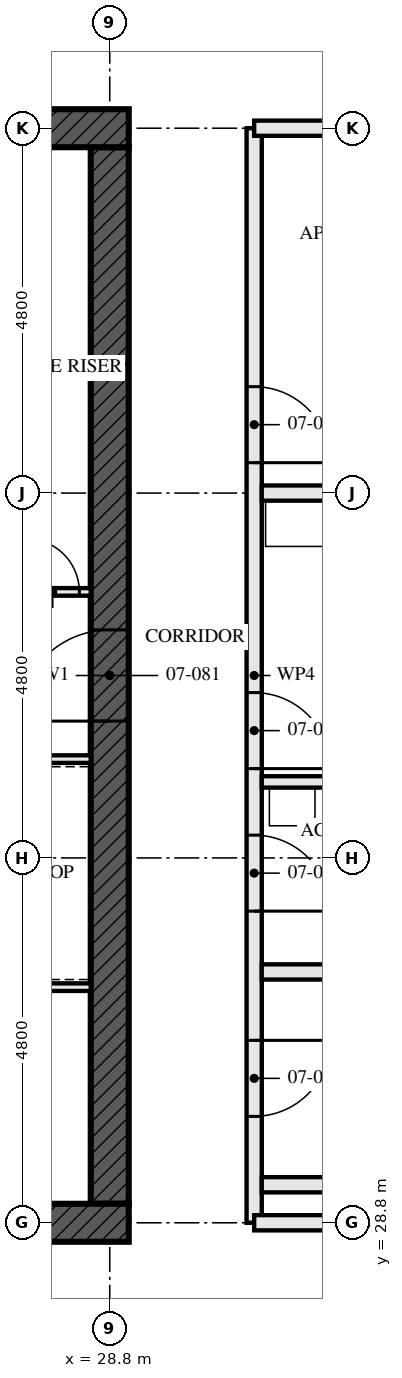
"""IFC4 building model, lengths in metres.
Left out: names, types, materials, properties, quantities, classifications, styles, units other than length and angle.
Written with IfcOpenShell. Run it as: python <this file> out.ifc"""

import sys

from ifc_helpers import new_model, si_unit, direction, frame, frame_2d, origin, place, context, subcontext, project, spatial, rectangle, extrude, element, fill, save


model = new_model("IFC4")
c1 = context("Model", 3, precision=1e-05, world=origin(), true_north=direction((0.0, 1.0)))
c2 = subcontext(c1, "Body", "Model", "MODEL_VIEW")
j1 = project(units=[si_unit("LENGTHUNIT", "METRE"), si_unit("PLANEANGLEUNIT", "RADIAN")], contexts=[c1])
p1 = place(None, origin())
s1 = spatial("IfcSite", under=j1, at=p1, CompositionType="ELEMENT")
p2 = place(p1, origin())
s2 = spatial("IfcBuilding", under=s1, at=p2, CompositionType="ELEMENT")
p3 = place(p2, frame((0.0, 0.0, 30.5)))
s3 = spatial("IfcBuildingStorey", under=s2, at=p3, CompositionType="ELEMENT", Elevation=30.5)
p4 = place(p3, frame((14.15, 28.8, -0.17), z_axis=(0.0, 0.0, 1.0), x_axis=(1.0, 0.0, 0.0)))
e1 = element("IfcWall", 1, at=p4, inside=s3, PredefinedType="SHEAR", context=c2, shape_type="SweptSolid", body=[
    extrude(rectangle(XDim=14.9, YDim=0.5, at=frame_2d((7.45, 0.0))), origin(), (0.0, 0.0, 1.0), 3.5),
])
p5 = place(p4, frame((6.85, 0.0, 0.17)))
e2 = element("IfcOpeningElement", 2, at=p5, cuts=e1, PredefinedType="OPENING", context=c2, shape_type="SweptSolid", body=[
    extrude(rectangle(XDim=1.2, YDim=2.1, at=frame_2d((0.6, 1.05))), frame((0.0, 0.26, 0.0), z_axis=(0.0, -1.0, 0.0), x_axis=(1.0, 0.0, 0.0)), (0.0, 0.0, 1.0), 0.521),
])
p6 = place(p3, frame((29.05, 43.2, -0.17), z_axis=(0.0, 0.0, 1.0), x_axis=(-1.0, 0.0, 0.0)))
e3 = element("IfcWall", 3, at=p6, inside=s3, PredefinedType="SHEAR", context=c2, shape_type="SweptSolid", body=[
    extrude(rectangle(XDim=14.9, YDim=0.5, at=frame_2d((7.45, 0.0))), origin(), (0.0, 0.0, 1.0), 3.5),
])
p7 = place(p6, frame((6.85, 0.0, 0.17)))
e4 = element("IfcOpeningElement", 4, at=p7, cuts=e3, PredefinedType="OPENING", context=c2, shape_type="SweptSolid", body=[
    extrude(rectangle(XDim=1.2, YDim=2.1, at=frame_2d((0.6, 1.05))), frame((0.0, 0.26, 0.0), z_axis=(0.0, -1.0, 0.0), x_axis=(1.0, 0.0, 0.0)), (0.0, 0.0, 1.0), 0.521),
])
p8 = place(p3, frame((28.8, 29.05, -0.17), z_axis=(0.0, 0.0, 1.0), x_axis=(0.0, 1.0, 0.0)))
e5 = element("IfcWall", 5, at=p8, inside=s3, PredefinedType="SHEAR", context=c2, shape_type="SweptSolid", body=[
    extrude(rectangle(XDim=13.9, YDim=0.5, at=frame_2d((6.95, 0.0))), origin(), (0.0, 0.0, 1.0), 3.5),
])
p9 = place(p8, frame((6.35, 0.0, 0.17)))
e6 = element("IfcOpeningElement", 6, at=p9, cuts=e5, PredefinedType="OPENING", context=c2, shape_type="SweptSolid", body=[
    extrude(rectangle(XDim=1.2, YDim=2.1, at=frame_2d((0.6, 1.05))), frame((0.0, 0.26, 0.0), z_axis=(0.0, -1.0, 0.0), x_axis=(1.0, 0.0, 0.0)), (0.0, 0.0, 1.0), 0.521),
])
for number, where, z_axis, x_axis in (
    (7, (35.5, 29.3, 0.0), (0.0, 0.0, 1.0), (-1.0, 0.0, 0.0)),
    (8, (35.5, 32.1, 0.0), (0.0, 0.0, 1.0), (-1.0, 0.0, 0.0)),
):
    element("IfcWall", number, at=place(p3, frame(where, z_axis=z_axis, x_axis=x_axis)), inside=s3, PredefinedType="SOLIDWALL", context=c2, shape_type="SweptSolid", body=[
        extrude(rectangle(XDim=4.7, YDim=0.2, at=frame_2d((2.35, 0.0))), origin(), (0.0, 0.0, 1.0), 2.99),
    ])
p10 = place(p3, frame((33.8, 34.6, 0.0), z_axis=(0.0, 0.0, 1.0), x_axis=(-1.0, 0.0, 0.0)))
e9 = element("IfcWall", 9, at=p10, inside=s3, PredefinedType="PARTITIONING", context=c2, shape_type="SweptSolid", body=[
    extrude(rectangle(XDim=3.0, YDim=0.15, at=frame_2d((1.5, 0.0))), origin(), (0.0, 0.0, 1.0), 3.33),
])
p11 = place(p3, frame((42.805, 38.4, 0.0), z_axis=(0.0, 0.0, 1.0), x_axis=(-1.0, 0.0, 0.0)))
e10 = element("IfcWall", 10, at=p11, inside=s3, PredefinedType="PARTITIONING", context=c2, shape_type="SweptSolid", body=[
    extrude(rectangle(XDim=12.005, YDim=0.2, at=frame_2d((6.002, 0.0))), origin(), (0.0, 0.0, 1.0), 2.55),
])
p12 = place(p3, frame((30.7, 28.8, 0.0), z_axis=(0.0, 0.0, 1.0), x_axis=(0.0, 1.0, 0.0)))
e11 = element("IfcWall", 11, at=p12, inside=s3, PredefinedType="PARTITIONING", context=c2, shape_type="SweptSolid", body=[
    extrude(rectangle(XDim=14.4, YDim=0.2, at=frame_2d((7.2, 0.0))), origin(), (0.0, 0.0, 1.0), 2.55),
])
p13 = place(p12, frame((1.4, 0.0, 0.0)))
e12 = element("IfcOpeningElement", 12, at=p13, cuts=e11, PredefinedType="OPENING", context=c2, shape_type="SweptSolid", body=[
    extrude(rectangle(XDim=1.0, YDim=2.1, at=frame_2d((0.5, 1.05))), frame((0.0, 0.111, 0.0), z_axis=(0.0, -1.0, 0.0), x_axis=(1.0, 0.0, 0.0)), (0.0, 0.0, 1.0), 0.221),
])
p14 = place(p12, frame((4.1, 0.0, 0.0)))
e13 = element("IfcOpeningElement", 13, at=p14, cuts=e11, PredefinedType="OPENING", context=c2, shape_type="SweptSolid", body=[
    extrude(rectangle(XDim=1.0, YDim=2.1, at=frame_2d((0.5, 1.05))), frame((0.0, 0.111, 0.0), z_axis=(0.0, -1.0, 0.0), x_axis=(1.0, 0.0, 0.0)), (0.0, 0.0, 1.0), 0.221),
])
p15 = place(p12, frame((5.975, 0.0, 0.0)))
e14 = element("IfcOpeningElement", 14, at=p15, cuts=e11, PredefinedType="OPENING", context=c2, shape_type="SweptSolid", body=[
    extrude(rectangle(XDim=1.0, YDim=2.1, at=frame_2d((0.5, 1.05))), frame((0.0, 0.111, 0.0), z_axis=(0.0, -1.0, 0.0), x_axis=(1.0, 0.0, 0.0)), (0.0, 0.0, 1.0), 0.221),
])
p16 = place(p12, frame((10.0, 0.0, 0.0)))
e15 = element("IfcOpeningElement", 15, at=p16, cuts=e11, PredefinedType="OPENING", context=c2, shape_type="SweptSolid", body=[
    extrude(rectangle(XDim=1.0, YDim=2.1, at=frame_2d((0.5, 1.05))), frame((0.0, 0.111, 0.0), z_axis=(0.0, -1.0, 0.0), x_axis=(1.0, 0.0, 0.0)), (0.0, 0.0, 1.0), 0.221),
])
p17 = place(p3, frame((23.05, 34.9, 0.0), z_axis=(0.0, 0.0, 1.0), x_axis=(1.0, 0.0, 0.0)))
e16 = element("IfcWall", 16, at=p17, inside=s3, PredefinedType="SOLIDWALL", context=c2, shape_type="SweptSolid", body=[
    extrude(rectangle(XDim=5.5, YDim=0.1, at=frame_2d((2.75, 0.0))), origin(), (0.0, 0.0, 1.0), 3.33),
])
p18 = place(p3, frame((22.65, 37.1, 0.0), z_axis=(0.0, 0.0, 1.0), x_axis=(1.0, 0.0, 0.0)))
e17 = element("IfcWall", 17, at=p18, inside=s3, PredefinedType="SOLIDWALL", context=c2, shape_type="SweptSolid", body=[
    extrude(rectangle(XDim=5.9, YDim=0.1, at=frame_2d((2.95, 0.0))), origin(), (0.0, 0.0, 1.0), 3.33),
])
p19 = place(p18, frame((3.5, 0.0, 0.0)))
e18 = element("IfcOpeningElement", 18, at=p19, cuts=e17, PredefinedType="OPENING", context=c2, shape_type="SweptSolid", body=[
    extrude(rectangle(XDim=0.9, YDim=2.1, at=frame_2d((0.45, 1.05))), frame((0.0, 0.061, 0.0), z_axis=(0.0, -1.0, 0.0), x_axis=(1.0, 0.0, 0.0)), (0.0, 0.0, 1.0), 0.121),
])
p20 = place(p18, frame((5.05, 0.0, 0.0)))
e19 = element("IfcOpeningElement", 19, at=p20, cuts=e17, PredefinedType="OPENING", context=c2, shape_type="SweptSolid", body=[
    extrude(rectangle(XDim=0.7, YDim=2.1, at=frame_2d((0.35, 1.05))), frame((0.0, 0.061, 0.0), z_axis=(0.0, -1.0, 0.0), x_axis=(1.0, 0.0, 0.0)), (0.0, 0.0, 1.0), 0.121),
])
p21 = place(p3, frame((23.15, 31.9, 0.0), z_axis=(0.0, 0.0, 1.0), x_axis=(1.0, 0.0, 0.0)))
e20 = element("IfcWall", 20, at=p21, inside=s3, PredefinedType="SOLIDWALL", context=c2, shape_type="SweptSolid", body=[
    extrude(rectangle(XDim=5.4, YDim=0.1, at=frame_2d((2.7, 0.0))), origin(), (0.0, 0.0, 1.0), 3.33),
])
for number, where, z_axis, x_axis in (
    (21, (33.205, 28.8, 0.0), (0.0, 0.0, 1.0), (-1.0, 0.0, 0.0)),
    (22, (33.205, 43.2, 0.0), (0.0, 0.0, 1.0), (-1.0, 0.0, 0.0)),
):
    element("IfcWall", number, at=place(p3, frame(where, z_axis=z_axis, x_axis=x_axis)), inside=s3, PredefinedType="PARTITIONING", context=c2, shape_type="SweptSolid", body=[
        extrude(rectangle(XDim=2.505, YDim=0.2, at=frame_2d((1.252, 0.0))), origin(), (0.0, 0.0, 1.0), 2.32),
    ])
p22 = place(p13, frame((1.0, 0.0, 0.0), z_axis=(0.0, 0.0, 1.0), x_axis=(-1.0, 0.0, 0.0)))
e23 = element("IfcDoor", 23, at=p22, inside=s3, OperationType="SINGLE_SWING_RIGHT", PredefinedType="DOOR", context=c2, shape_type="SweptSolid", body=[
    extrude(rectangle(XDim=1.0, YDim=2.1, at=frame_2d((0.5, 1.05))), frame((0.0, 0.032, 0.0), z_axis=(0.0, -1.0, 0.0), x_axis=(1.0, 0.0, 0.0)), (0.0, 0.0, 1.0), 0.064),
])
fill(e12, e23)
p23 = place(p14, frame((1.0, 0.0, 0.0), z_axis=(0.0, 0.0, 1.0), x_axis=(-1.0, 0.0, 0.0)))
e24 = element("IfcDoor", 24, at=p23, inside=s3, OperationType="SINGLE_SWING_LEFT", PredefinedType="DOOR", context=c2, shape_type="SweptSolid", body=[
    extrude(rectangle(XDim=1.0, YDim=2.1, at=frame_2d((0.5, 1.05))), frame((0.0, 0.027, 0.0), z_axis=(0.0, -1.0, 0.0), x_axis=(1.0, 0.0, 0.0)), (0.0, 0.0, 1.0), 0.054),
])
fill(e13, e24)
p24 = place(p15, frame((1.0, 0.0, 0.0), z_axis=(0.0, 0.0, 1.0), x_axis=(-1.0, 0.0, 0.0)))
e25 = element("IfcDoor", 25, at=p24, inside=s3, OperationType="SINGLE_SWING_LEFT", PredefinedType="DOOR", context=c2, shape_type="SweptSolid", body=[
    extrude(rectangle(XDim=1.0, YDim=2.1, at=frame_2d((0.5, 1.05))), frame((0.0, 0.027, 0.0), z_axis=(0.0, -1.0, 0.0), x_axis=(1.0, 0.0, 0.0)), (0.0, 0.0, 1.0), 0.054),
])
fill(e14, e25)
p25 = place(p16, frame((1.0, 0.0, 0.0), z_axis=(0.0, 0.0, 1.0), x_axis=(-1.0, 0.0, 0.0)))
e26 = element("IfcDoor", 26, at=p25, inside=s3, OperationType="SINGLE_SWING_LEFT", PredefinedType="DOOR", context=c2, shape_type="SweptSolid", body=[
    extrude(rectangle(XDim=1.0, YDim=2.1, at=frame_2d((0.5, 1.05))), frame((0.0, 0.027, 0.0), z_axis=(0.0, -1.0, 0.0), x_axis=(1.0, 0.0, 0.0)), (0.0, 0.0, 1.0), 0.054),
])
fill(e15, e26)
p26 = place(p20, origin())
e27 = element("IfcDoor", 27, at=p26, inside=s3, OperationType="SINGLE_SWING_RIGHT", PredefinedType="DOOR", context=c2, shape_type="SweptSolid", body=[
    extrude(rectangle(XDim=0.7, YDim=2.1, at=frame_2d((0.35, 1.05))), frame((0.0, 0.027, 0.0), z_axis=(0.0, -1.0, 0.0), x_axis=(1.0, 0.0, 0.0)), (0.0, 0.0, 1.0), 0.054),
])
fill(e19, e27)
p27 = place(p9, origin())
e28 = element("IfcDoor", 28, at=p27, inside=s3, OperationType="SINGLE_SWING_LEFT", PredefinedType="DOOR", context=c2, shape_type="SweptSolid", body=[
    extrude(rectangle(XDim=1.2, YDim=2.1, at=frame_2d((0.6, 1.05))), frame((0.0, 0.027, 0.0), z_axis=(0.0, -1.0, 0.0), x_axis=(1.0, 0.0, 0.0)), (0.0, 0.0, 1.0), 0.054),
])
fill(e6, e28)
save(model, sys.argv[1])
